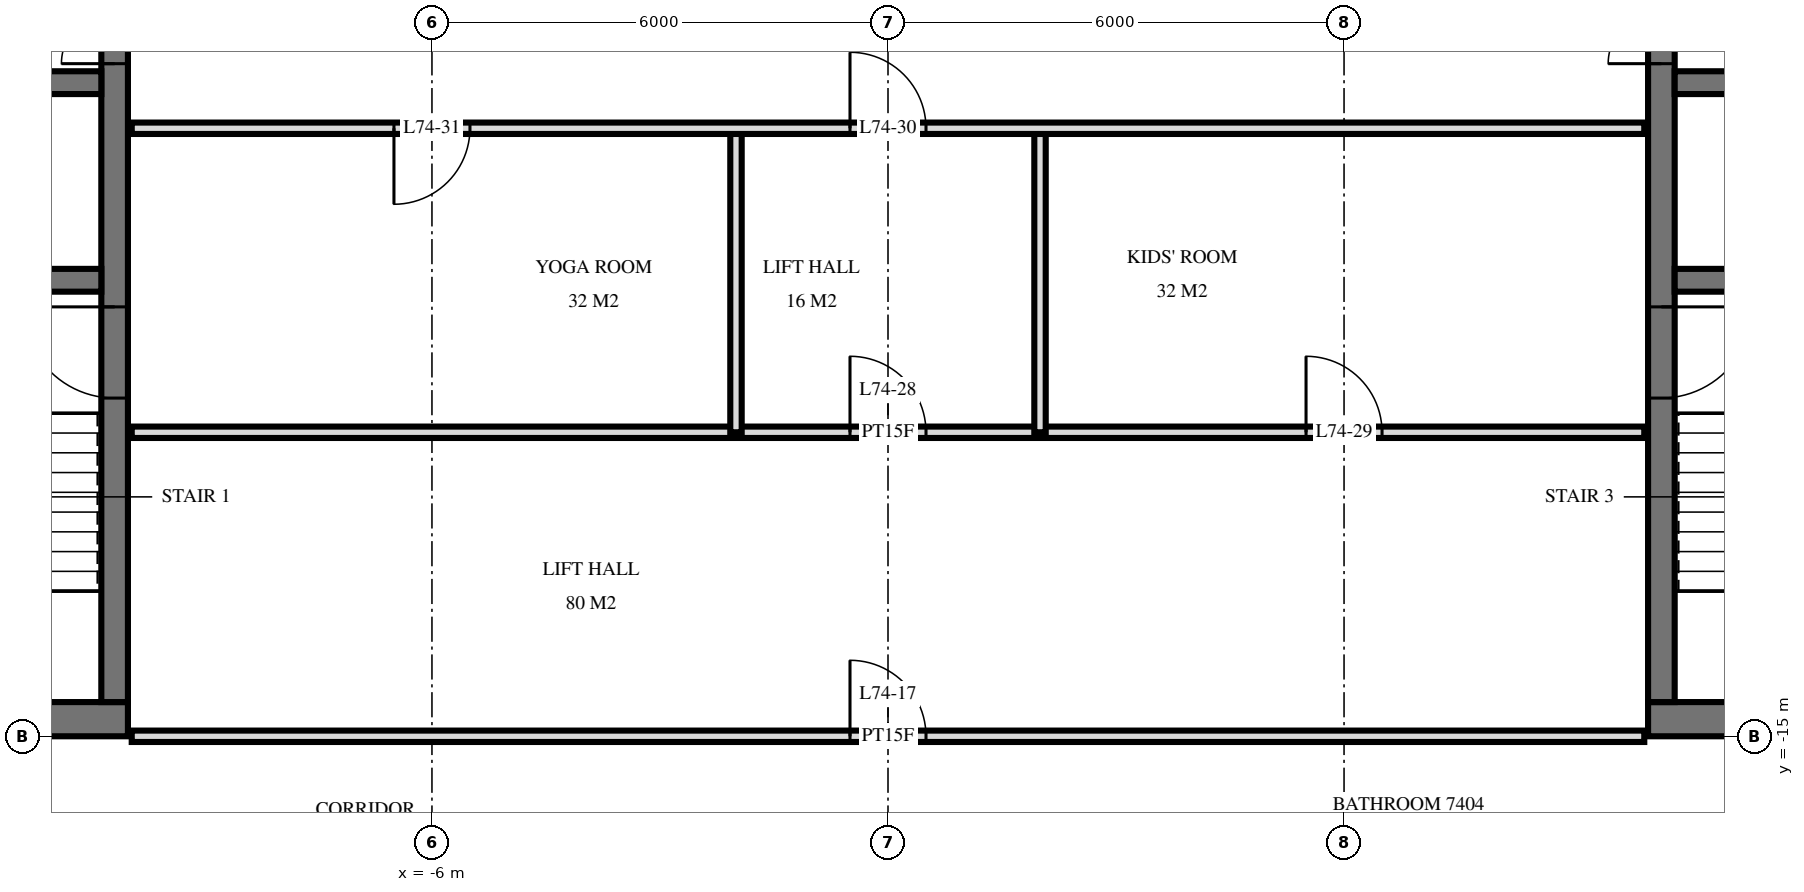
"""IFC4 building model, lengths in metres.
Left out: names, types, materials, properties, quantities, classifications, styles, units other than length and angle.
Written with IfcOpenShell. Run it as: python <this file> out.ifc"""

import sys

from ifc_helpers import new_model, si_unit, direction, frame, frame_2d, origin, place, context, subcontext, project, spatial, rectangle, extrude, element, fill, save


model = new_model("IFC4")
c1 = context("Model", 3, precision=1e-05, world=origin(), true_north=direction((0.0, 1.0)))
c2 = subcontext(c1, "Body", "Model", "MODEL_VIEW")
j1 = project(units=[si_unit("LENGTHUNIT", "METRE"), si_unit("PLANEANGLEUNIT", "RADIAN")], contexts=[c1])
p1 = place(None, origin())
s1 = spatial("IfcSite", under=j1, at=p1, CompositionType="ELEMENT")
p2 = place(p1, origin())
s2 = spatial("IfcBuilding", under=s1, at=p2, CompositionType="ELEMENT")
p3 = place(p2, frame((0.0, 0.0, 280.6)))
s3 = spatial("IfcBuildingStorey", under=s2, at=p3, CompositionType="ELEMENT", Elevation=280.6)
p4 = place(p3, frame((-19.5, -14.775, 0.0), z_axis=(0.0, 0.0, 1.0), x_axis=(1.0, 0.0, 0.0)))
e1 = element("IfcWall", 1, at=p4, inside=s3, PredefinedType="SHEAR", context=c2, shape_type="SweptSolid", body=[
    extrude(rectangle(XDim=9.5, YDim=0.45, at=frame_2d((4.75, 0.0))), origin(), (0.0, 0.0, 1.0), 3.5),
])
p5 = place(p4, frame((1.2, 0.0, 0.0)))
e2 = element("IfcOpeningElement", 2, at=p5, cuts=e1, PredefinedType="OPENING", context=c2, shape_type="SweptSolid", body=[
    extrude(rectangle(XDim=1.2, YDim=2.1, at=frame_2d((0.6, 1.05))), frame((0.0, 0.235, 0.0), z_axis=(0.0, -1.0, 0.0), x_axis=(1.0, 0.0, 0.0)), (0.0, 0.0, 1.0), 0.47),
])
p6 = place(p4, frame((4.25, 0.0, 0.0)))
e3 = element("IfcOpeningElement", 3, at=p6, cuts=e1, PredefinedType="OPENING", context=c2, shape_type="SweptSolid", body=[
    extrude(rectangle(XDim=1.1, YDim=2.1, at=frame_2d((0.55, 1.05))), frame((0.0, 0.235, 0.0), z_axis=(0.0, -1.0, 0.0), x_axis=(1.0, 0.0, 0.0)), (0.0, 0.0, 1.0), 0.47),
])
p7 = place(p3, frame((-10.175, -14.55, 0.0), z_axis=(0.0, 0.0, 1.0), x_axis=(0.0, 1.0, 0.0)))
e4 = element("IfcWall", 4, at=p7, inside=s3, PredefinedType="SHEAR", context=c2, shape_type="SweptSolid", body=[
    extrude(rectangle(XDim=14.1, YDim=0.35, at=frame_2d((7.05, 0.0))), origin(), (0.0, 0.0, 1.0), 3.5),
])
p8 = place(p7, frame((8.4, 0.0, 0.0)))
e5 = element("IfcOpeningElement", 5, at=p8, cuts=e4, PredefinedType="OPENING", context=c2, shape_type="SweptSolid", body=[
    extrude(rectangle(XDim=1.4, YDim=2.4, at=frame_2d((0.7, 1.2))), frame((0.0, 0.185, 0.0), z_axis=(0.0, -1.0, 0.0), x_axis=(1.0, 0.0, 0.0)), (0.0, 0.0, 1.0), 0.37),
])
p9 = place(p7, frame((10.0, 0.0, 0.0)))
e6 = element("IfcOpeningElement", 6, at=p9, cuts=e4, PredefinedType="OPENING", context=c2, shape_type="SweptSolid", body=[
    extrude(rectangle(XDim=1.4, YDim=2.4, at=frame_2d((0.7, 1.2))), frame((0.0, 0.185, 0.0), z_axis=(0.0, -1.0, 0.0), x_axis=(1.0, 0.0, 0.0)), (0.0, 0.0, 1.0), 0.37),
])
p10 = place(p7, frame((4.0, 0.0, 0.0)))
e7 = element("IfcOpeningElement", 7, at=p10, cuts=e4, PredefinedType="OPENING", context=c2, shape_type="SweptSolid", body=[
    extrude(rectangle(XDim=1.2, YDim=2.1, at=frame_2d((0.6, 1.05))), frame((0.0, 0.185, 0.0), z_axis=(0.0, -1.0, 0.0), x_axis=(1.0, 0.0, 0.0)), (0.0, 0.0, 1.0), 0.37),
])
p11 = place(p3, frame((-19.05, -6.4, 0.0), z_axis=(0.0, 0.0, 1.0), x_axis=(1.0, 0.0, 0.0)))
e8 = element("IfcWall", 8, at=p11, inside=s3, PredefinedType="SHEAR", context=c2, shape_type="SweptSolid", body=[
    extrude(rectangle(XDim=8.7, YDim=0.3, at=frame_2d((4.35, 0.0))), origin(), (0.0, 0.0, 1.0), 3.5),
])
p12 = place(p11, frame((0.8, 0.0, 0.0)))
e9 = element("IfcOpeningElement", 9, at=p12, cuts=e8, PredefinedType="OPENING", context=c2, shape_type="SweptSolid", body=[
    extrude(rectangle(XDim=1.1, YDim=2.1, at=frame_2d((0.55, 1.05))), frame((0.0, 0.16, 0.0), z_axis=(0.0, -1.0, 0.0), x_axis=(1.0, 0.0, 0.0)), (0.0, 0.0, 1.0), 0.32),
])
p13 = place(p3, frame((-19.05, -9.0, 0.0), z_axis=(0.0, 0.0, 1.0), x_axis=(1.0, 0.0, 0.0)))
e10 = element("IfcWall", 10, at=p13, inside=s3, PredefinedType="SHEAR", context=c2, shape_type="SweptSolid", body=[
    extrude(rectangle(XDim=8.7, YDim=0.3, at=frame_2d((4.35, 0.0))), origin(), (0.0, 0.0, 1.0), 3.5),
])
p14 = place(p13, frame((3.8, 0.0, 0.0)))
e11 = element("IfcOpeningElement", 11, at=p14, cuts=e10, PredefinedType="OPENING", context=c2, shape_type="SweptSolid", body=[
    extrude(rectangle(XDim=1.1, YDim=2.1, at=frame_2d((0.55, 1.05))), frame((0.0, 0.16, 0.0), z_axis=(0.0, -1.0, 0.0), x_axis=(1.0, 0.0, 0.0)), (0.0, 0.0, 1.0), 0.32),
])
p15 = place(p3, frame((10.0, -14.775, 0.0), z_axis=(0.0, 0.0, 1.0), x_axis=(1.0, 0.0, 0.0)))
e12 = element("IfcWall", 12, at=p15, inside=s3, PredefinedType="SHEAR", context=c2, shape_type="SweptSolid", body=[
    extrude(rectangle(XDim=9.5, YDim=0.45, at=frame_2d((4.75, 0.0))), origin(), (0.0, 0.0, 1.0), 3.5),
])
p16 = place(p15, frame((7.1, 0.0, 0.0)))
e13 = element("IfcOpeningElement", 13, at=p16, cuts=e12, PredefinedType="OPENING", context=c2, shape_type="SweptSolid", body=[
    extrude(rectangle(XDim=1.2, YDim=2.1, at=frame_2d((0.6, 1.05))), frame((0.0, 0.235, 0.0), z_axis=(0.0, -1.0, 0.0), x_axis=(1.0, 0.0, 0.0)), (0.0, 0.0, 1.0), 0.47),
])
p17 = place(p15, frame((4.15, 0.0, 0.0)))
e14 = element("IfcOpeningElement", 14, at=p17, cuts=e12, PredefinedType="OPENING", context=c2, shape_type="SweptSolid", body=[
    extrude(rectangle(XDim=1.1, YDim=2.1, at=frame_2d((0.55, 1.05))), frame((0.0, 0.235, 0.0), z_axis=(0.0, -1.0, 0.0), x_axis=(1.0, 0.0, 0.0)), (0.0, 0.0, 1.0), 0.47),
])
p18 = place(p3, frame((10.175, -14.55, 0.0), z_axis=(0.0, 0.0, 1.0), x_axis=(0.0, 1.0, 0.0)))
e15 = element("IfcWall", 15, at=p18, inside=s3, PredefinedType="SHEAR", context=c2, shape_type="SweptSolid", body=[
    extrude(rectangle(XDim=14.1, YDim=0.35, at=frame_2d((7.05, 0.0))), origin(), (0.0, 0.0, 1.0), 3.5),
])
p19 = place(p18, frame((8.4, 0.0, 0.0)))
e16 = element("IfcOpeningElement", 16, at=p19, cuts=e15, PredefinedType="OPENING", context=c2, shape_type="SweptSolid", body=[
    extrude(rectangle(XDim=1.4, YDim=2.4, at=frame_2d((0.7, 1.2))), frame((0.0, 0.185, 0.0), z_axis=(0.0, -1.0, 0.0), x_axis=(1.0, 0.0, 0.0)), (0.0, 0.0, 1.0), 0.37),
])
p20 = place(p18, frame((10.0, 0.0, 0.0)))
e17 = element("IfcOpeningElement", 17, at=p20, cuts=e15, PredefinedType="OPENING", context=c2, shape_type="SweptSolid", body=[
    extrude(rectangle(XDim=1.4, YDim=2.4, at=frame_2d((0.7, 1.2))), frame((0.0, 0.185, 0.0), z_axis=(0.0, -1.0, 0.0), x_axis=(1.0, 0.0, 0.0)), (0.0, 0.0, 1.0), 0.37),
])
p21 = place(p18, frame((4.0, 0.0, 0.0)))
e18 = element("IfcOpeningElement", 18, at=p21, cuts=e15, PredefinedType="OPENING", context=c2, shape_type="SweptSolid", body=[
    extrude(rectangle(XDim=1.2, YDim=2.1, at=frame_2d((0.6, 1.05))), frame((0.0, 0.185, 0.0), z_axis=(0.0, -1.0, 0.0), x_axis=(1.0, 0.0, 0.0)), (0.0, 0.0, 1.0), 0.37),
])
p22 = place(p3, frame((10.35, -6.4, 0.0), z_axis=(0.0, 0.0, 1.0), x_axis=(1.0, 0.0, 0.0)))
e19 = element("IfcWall", 19, at=p22, inside=s3, PredefinedType="SHEAR", context=c2, shape_type="SweptSolid", body=[
    extrude(rectangle(XDim=8.7, YDim=0.3, at=frame_2d((4.35, 0.0))), origin(), (0.0, 0.0, 1.0), 3.5),
])
p23 = place(p22, frame((6.8, 0.0, 0.0)))
e20 = element("IfcOpeningElement", 20, at=p23, cuts=e19, PredefinedType="OPENING", context=c2, shape_type="SweptSolid", body=[
    extrude(rectangle(XDim=1.1, YDim=2.1, at=frame_2d((0.55, 1.05))), frame((0.0, 0.16, 0.0), z_axis=(0.0, -1.0, 0.0), x_axis=(1.0, 0.0, 0.0)), (0.0, 0.0, 1.0), 0.32),
])
p24 = place(p3, frame((10.35, -9.0, 0.0), z_axis=(0.0, 0.0, 1.0), x_axis=(1.0, 0.0, 0.0)))
e21 = element("IfcWall", 21, at=p24, inside=s3, PredefinedType="SHEAR", context=c2, shape_type="SweptSolid", body=[
    extrude(rectangle(XDim=8.7, YDim=0.3, at=frame_2d((4.35, 0.0))), origin(), (0.0, 0.0, 1.0), 3.5),
])
p25 = place(p24, frame((3.8, 0.0, 0.0)))
e22 = element("IfcOpeningElement", 22, at=p25, cuts=e21, PredefinedType="OPENING", context=c2, shape_type="SweptSolid", body=[
    extrude(rectangle(XDim=1.1, YDim=2.1, at=frame_2d((0.55, 1.05))), frame((0.0, 0.16, 0.0), z_axis=(0.0, -1.0, 0.0), x_axis=(1.0, 0.0, 0.0)), (0.0, 0.0, 1.0), 0.32),
])
for number, where, z_axis, x_axis in (
    (23, (2.0, -11.0, 0.0), (0.0, 0.0, 1.0), (0.0, 1.0, 0.0)),
    (24, (-2.0, -11.0, 0.0), (0.0, 0.0, 1.0), (0.0, 1.0, 0.0)),
):
    element("IfcWall", number, at=place(p3, frame(where, z_axis=z_axis, x_axis=x_axis)), inside=s3, PredefinedType="PARTITIONING", context=c2, shape_type="SweptSolid", body=[
        extrude(rectangle(XDim=4.0, YDim=0.15, at=frame_2d((2.0, 0.0))), origin(), (0.0, 0.0, 1.0), 3.22),
    ])
p26 = place(p3, frame((-9.95, -15.0, 0.0), z_axis=(0.0, 0.0, 1.0), x_axis=(1.0, 0.0, 0.0)))
e25 = element("IfcWall", 25, at=p26, inside=s3, PredefinedType="PARTITIONING", context=c2, shape_type="SweptSolid", body=[
    extrude(rectangle(XDim=19.9, YDim=0.15, at=frame_2d((9.95, 0.0))), origin(), (0.0, 0.0, 1.0), 2.584),
])
p27 = place(p26, frame((9.45, 0.0, 0.0)))
e26 = element("IfcOpeningElement", 26, at=p27, cuts=e25, PredefinedType="OPENING", context=c2, shape_type="SweptSolid", body=[
    extrude(rectangle(XDim=1.0, YDim=2.1, at=frame_2d((0.5, 1.05))), frame((0.0, 0.085, 0.0), z_axis=(0.0, -1.0, 0.0), x_axis=(1.0, 0.0, 0.0)), (0.0, 0.0, 1.0), 0.17),
])
p28 = place(p3, frame((-9.95, -11.0, 0.0), z_axis=(0.0, 0.0, 1.0), x_axis=(1.0, 0.0, 0.0)))
e27 = element("IfcWall", 27, at=p28, inside=s3, PredefinedType="PARTITIONING", context=c2, shape_type="SweptSolid", body=[
    extrude(rectangle(XDim=19.9, YDim=0.15, at=frame_2d((9.95, 0.0))), origin(), (0.0, 0.0, 1.0), 3.22),
])
p29 = place(p28, frame((9.45, 0.0, 0.0)))
e28 = element("IfcOpeningElement", 28, at=p29, cuts=e27, PredefinedType="OPENING", context=c2, shape_type="SweptSolid", body=[
    extrude(rectangle(XDim=1.0, YDim=2.1, at=frame_2d((0.5, 1.05))), frame((0.0, 0.085, 0.0), z_axis=(0.0, -1.0, 0.0), x_axis=(1.0, 0.0, 0.0)), (0.0, 0.0, 1.0), 0.17),
])
p30 = place(p28, frame((15.45, 0.0, 0.0)))
e29 = element("IfcOpeningElement", 29, at=p30, cuts=e27, PredefinedType="OPENING", context=c2, shape_type="SweptSolid", body=[
    extrude(rectangle(XDim=1.0, YDim=2.1, at=frame_2d((0.5, 1.05))), frame((0.0, 0.085, 0.0), z_axis=(0.0, -1.0, 0.0), x_axis=(1.0, 0.0, 0.0)), (0.0, 0.0, 1.0), 0.17),
])
p31 = place(p3, frame((-9.95, -7.0, 0.0), z_axis=(0.0, 0.0, 1.0), x_axis=(1.0, 0.0, 0.0)))
e30 = element("IfcWall", 30, at=p31, inside=s3, PredefinedType="PARTITIONING", context=c2, shape_type="SweptSolid", body=[
    extrude(rectangle(XDim=19.9, YDim=0.15, at=frame_2d((9.95, 0.0))), origin(), (0.0, 0.0, 1.0), 3.22),
])
p32 = place(p31, frame((9.45, 0.0, 0.0)))
e31 = element("IfcOpeningElement", 31, at=p32, cuts=e30, PredefinedType="OPENING", context=c2, shape_type="SweptSolid", body=[
    extrude(rectangle(XDim=1.0, YDim=2.1, at=frame_2d((0.5, 1.05))), frame((0.0, 0.085, 0.0), z_axis=(0.0, -1.0, 0.0), x_axis=(1.0, 0.0, 0.0)), (0.0, 0.0, 1.0), 0.17),
])
p33 = place(p31, frame((3.45, 0.0, 0.0)))
e32 = element("IfcOpeningElement", 32, at=p33, cuts=e30, PredefinedType="OPENING", context=c2, shape_type="SweptSolid", body=[
    extrude(rectangle(XDim=1.0, YDim=2.1, at=frame_2d((0.5, 1.05))), frame((0.0, 0.085, 0.0), z_axis=(0.0, -1.0, 0.0), x_axis=(1.0, 0.0, 0.0)), (0.0, 0.0, 1.0), 0.17),
])
p34 = place(p8, origin())
e33 = element("IfcDoor", 33, at=p34, inside=s3, OperationType="DOUBLE_DOOR_SINGLE_SWING", PredefinedType="DOOR", context=c2, shape_type="SweptSolid", body=[
    extrude(rectangle(XDim=1.4, YDim=2.4, at=frame_2d((0.7, 1.2))), frame((0.0, 0.025, 0.0), z_axis=(0.0, -1.0, 0.0), x_axis=(1.0, 0.0, 0.0)), (0.0, 0.0, 1.0), 0.05),
])
fill(e5, e33)
p35 = place(p10, origin())
e34 = element("IfcDoor", 34, at=p35, inside=s3, OperationType="SINGLE_SWING_LEFT", PredefinedType="DOOR", context=c2, shape_type="SweptSolid", body=[
    extrude(rectangle(XDim=1.2, YDim=2.1, at=frame_2d((0.6, 1.05))), frame((0.0, 0.025, 0.0), z_axis=(0.0, -1.0, 0.0), x_axis=(1.0, 0.0, 0.0)), (0.0, 0.0, 1.0), 0.05),
])
fill(e7, e34)
p36 = place(p19, origin())
e35 = element("IfcDoor", 35, at=p36, inside=s3, OperationType="DOUBLE_DOOR_SINGLE_SWING", PredefinedType="DOOR", context=c2, shape_type="SweptSolid", body=[
    extrude(rectangle(XDim=1.4, YDim=2.4, at=frame_2d((0.7, 1.2))), frame((0.0, 0.025, 0.0), z_axis=(0.0, -1.0, 0.0), x_axis=(1.0, 0.0, 0.0)), (0.0, 0.0, 1.0), 0.05),
])
fill(e16, e35)
p37 = place(p21, frame((0.6, 0.0, 0.0), z_axis=(0.0, 0.0, 1.0), x_axis=(-1.0, 0.0, 0.0)))
e36 = element("IfcDoor", 36, at=p37, inside=s3, OperationType="SINGLE_SWING_RIGHT", PredefinedType="DOOR", context=c2, shape_type="SweptSolid", body=[
    extrude(rectangle(XDim=1.2, YDim=2.1, at=frame_2d((0.0, 1.05))), frame((0.0, -0.025, 0.0), z_axis=(0.0, 1.0, 0.0), x_axis=(-1.0, 0.0, 0.0)), (0.0, 0.0, 1.0), 0.05),
])
fill(e18, e36)
p38 = place(p27, origin())
e37 = element("IfcDoor", 37, at=p38, inside=s3, OperationType="SINGLE_SWING_RIGHT", PredefinedType="DOOR", context=c2, shape_type="SweptSolid", body=[
    extrude(rectangle(XDim=1.0, YDim=2.1, at=frame_2d((0.5, 1.05))), frame((0.0, 0.025, 0.0), z_axis=(0.0, -1.0, 0.0), x_axis=(1.0, 0.0, 0.0)), (0.0, 0.0, 1.0), 0.05),
])
fill(e26, e37)
p39 = place(p29, origin())
e38 = element("IfcDoor", 38, at=p39, inside=s3, OperationType="SINGLE_SWING_RIGHT", PredefinedType="DOOR", context=c2, shape_type="SweptSolid", body=[
    extrude(rectangle(XDim=1.0, YDim=2.1, at=frame_2d((0.5, 1.05))), frame((0.0, 0.025, 0.0), z_axis=(0.0, -1.0, 0.0), x_axis=(1.0, 0.0, 0.0)), (0.0, 0.0, 1.0), 0.05),
])
fill(e28, e38)
p40 = place(p30, origin())
e39 = element("IfcDoor", 39, at=p40, inside=s3, OperationType="SINGLE_SWING_RIGHT", PredefinedType="DOOR", context=c2, shape_type="SweptSolid", body=[
    extrude(rectangle(XDim=1.0, YDim=2.1, at=frame_2d((0.5, 1.05))), frame((0.0, 0.025, 0.0), z_axis=(0.0, -1.0, 0.0), x_axis=(1.0, 0.0, 0.0)), (0.0, 0.0, 1.0), 0.05),
])
fill(e29, e39)
p41 = place(p32, origin())
e40 = element("IfcDoor", 40, at=p41, inside=s3, OperationType="SINGLE_SWING_RIGHT", PredefinedType="DOOR", context=c2, shape_type="SweptSolid", body=[
    extrude(rectangle(XDim=1.0, YDim=2.1, at=frame_2d((0.5, 1.05))), frame((0.0, 0.025, 0.0), z_axis=(0.0, -1.0, 0.0), x_axis=(1.0, 0.0, 0.0)), (0.0, 0.0, 1.0), 0.05),
])
fill(e31, e40)
p42 = place(p33, frame((0.5, 0.0, 0.0), z_axis=(0.0, 0.0, 1.0), x_axis=(-1.0, 0.0, 0.0)))
e41 = element("IfcDoor", 41, at=p42, inside=s3, OperationType="SINGLE_SWING_LEFT", PredefinedType="DOOR", context=c2, shape_type="SweptSolid", body=[
    extrude(rectangle(XDim=1.0, YDim=2.1, at=frame_2d((0.0, 1.05))), frame((0.0, -0.025, 0.0), z_axis=(0.0, 1.0, 0.0), x_axis=(-1.0, 0.0, 0.0)), (0.0, 0.0, 1.0), 0.05),
])
fill(e32, e41)
save(model, sys.argv[1])
